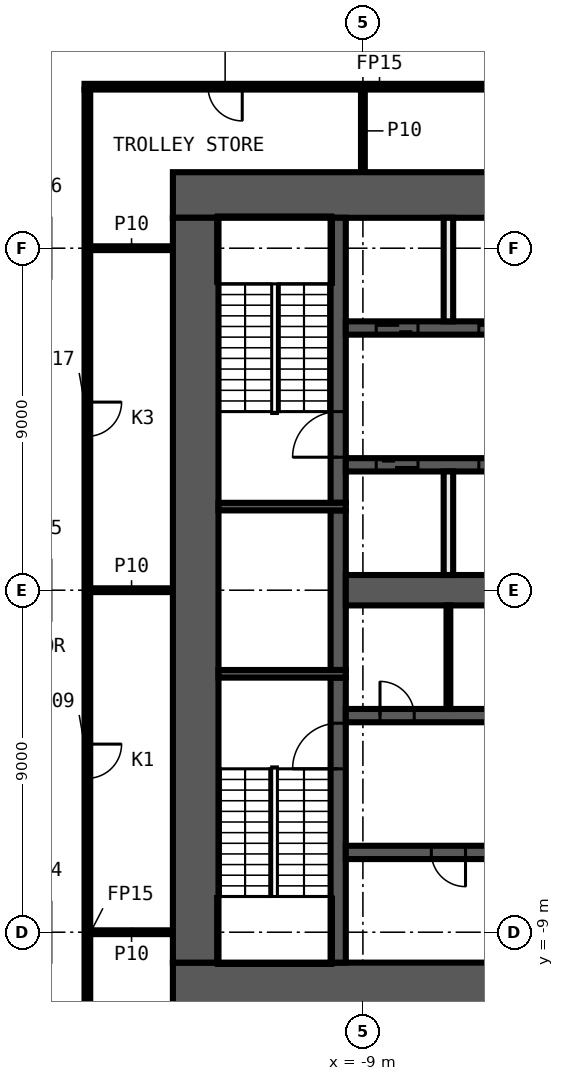
"""IFC4 building model, lengths in metres.
Left out: names, types, materials, properties, quantities, classifications, styles, units other than length and angle.
Written with IfcOpenShell. Run it as: python <this file> out.ifc"""

import sys

from ifc_helpers import new_model, si_unit, direction, frame, frame_2d, origin, place, context, subcontext, project, spatial, rectangle, extrude, element, fill, save


model = new_model("IFC4")
c1 = context("Model", 3, precision=1e-05, world=origin(), true_north=direction((0.0, 1.0)))
c2 = subcontext(c1, "Body", "Model", "MODEL_VIEW")
j1 = project(units=[si_unit("LENGTHUNIT", "METRE"), si_unit("PLANEANGLEUNIT", "RADIAN")], contexts=[c1])
p1 = place(None, origin())
s1 = spatial("IfcSite", under=j1, at=p1, CompositionType="ELEMENT")
p2 = place(p1, origin())
s2 = spatial("IfcBuilding", under=s1, at=p2, CompositionType="ELEMENT")
p3 = place(p2, frame((0.0, 0.0, 84.7)))
s3 = spatial("IfcBuildingStorey", under=s2, at=p3, CompositionType="ELEMENT", Elevation=84.7)
for number, where, z_axis, x_axis in (
    (1, (-16.175, -9.0, 0.0), (0.0, 0.0, 1.0), (1.0, 0.0, 0.0)),
    (2, (-16.175, 0.0, 0.0), (0.0, 0.0, 1.0), (1.0, 0.0, 0.0)),
    (3, (-16.175, 9.0, 0.0), (0.0, 0.0, 1.0), (1.0, 0.0, 0.0)),
):
    element("IfcWall", number, at=place(p3, frame(where, z_axis=z_axis, x_axis=x_axis)), inside=s3, PredefinedType="PARTITIONING", context=c2, shape_type="SweptSolid", body=[
        extrude(rectangle(XDim=2.175, YDim=0.1, at=frame_2d((1.087, 0.0))), origin(), (0.0, 0.0, 1.0), 3.9),
    ])
p4 = place(p3, frame((1.425, 13.25, 0.0), z_axis=(0.0, 0.0, 1.0), x_axis=(-1.0, 0.0, 0.0)))
e4 = element("IfcWall", 4, at=p4, inside=s3, PredefinedType="PARTITIONING", context=c2, shape_type="SweptSolid", body=[
    extrude(rectangle(XDim=17.75, YDim=0.15, at=frame_2d((8.875, 0.0))), origin(), (0.0, 0.0, 1.0), 3.9),
])
p5 = place(p4, frame((5.475, 0.0, 0.0)))
e5 = element("IfcOpeningElement", 5, at=p5, cuts=e4, PredefinedType="OPENING", context=c2, shape_type="SweptSolid", body=[
    extrude(rectangle(XDim=0.9, YDim=2.1, at=frame_2d((0.45, 1.05))), frame((0.0, 0.085, 0.0), z_axis=(0.0, -1.0, 0.0), x_axis=(1.0, 0.0, 0.0)), (0.0, 0.0, 1.0), 0.17),
])
p6 = place(p4, frame((13.6, 0.0, 0.0)))
e6 = element("IfcOpeningElement", 6, at=p6, cuts=e4, PredefinedType="OPENING", context=c2, shape_type="SweptSolid", body=[
    extrude(rectangle(XDim=0.9, YDim=2.1, at=frame_2d((0.45, 1.05))), frame((0.0, 0.085, 0.0), z_axis=(0.0, -1.0, 0.0), x_axis=(1.0, 0.0, 0.0)), (0.0, 0.0, 1.0), 0.17),
])
p7 = place(p3, frame((-9.0, 11.0, 0.0), z_axis=(0.0, 0.0, 1.0), x_axis=(0.0, 1.0, 0.0)))
e7 = element("IfcWall", 7, at=p7, inside=s3, PredefinedType="PARTITIONING", context=c2, shape_type="SweptSolid", body=[
    extrude(rectangle(XDim=2.175, YDim=0.1, at=frame_2d((1.087, 0.0))), origin(), (0.0, 0.0, 1.0), 3.9),
])
p8 = place(p3, frame((-16.25, 13.175, 0.0), z_axis=(0.0, 0.0, 1.0), x_axis=(0.0, -1.0, 0.0)))
e8 = element("IfcWall", 8, at=p8, inside=s3, PredefinedType="PARTITIONING", context=c2, shape_type="SweptSolid", body=[
    extrude(rectangle(XDim=26.35, YDim=0.15, at=frame_2d((13.175, 0.0))), origin(), (0.0, 0.0, 1.0), 3.9),
])
p9 = place(p8, frame((17.225, 0.0, 0.0)))
e9 = element("IfcOpeningElement", 9, at=p9, cuts=e8, PredefinedType="OPENING", context=c2, shape_type="SweptSolid", body=[
    extrude(rectangle(XDim=0.9, YDim=2.1, at=frame_2d((0.45, 1.05))), frame((0.0, 0.085, 0.0), z_axis=(0.0, -1.0, 0.0), x_axis=(1.0, 0.0, 0.0)), (0.0, 0.0, 1.0), 0.17),
])
p10 = place(p8, frame((8.225, 0.0, 0.0)))
e10 = element("IfcOpeningElement", 10, at=p10, cuts=e8, PredefinedType="OPENING", context=c2, shape_type="SweptSolid", body=[
    extrude(rectangle(XDim=0.9, YDim=2.1, at=frame_2d((0.45, 1.05))), frame((0.0, 0.085, 0.0), z_axis=(0.0, -1.0, 0.0), x_axis=(1.0, 0.0, 0.0)), (0.0, 0.0, 1.0), 0.17),
])
p11 = place(p3, frame((-14.0, 10.4, 0.0), z_axis=(0.0, 0.0, 1.0), x_axis=(1.0, 0.0, 0.0)))
e11 = element("IfcWall", 11, at=p11, inside=s3, PredefinedType="SHEAR", context=c2, shape_type="SweptSolid", body=[
    extrude(rectangle(XDim=28.0, YDim=1.2, at=frame_2d((14.0, 0.0))), origin(), (0.0, 0.0, 1.0), 3.9),
])
p12 = place(p11, frame((15.9, 0.0, 0.0)))
e12 = element("IfcOpeningElement", 12, at=p12, cuts=e11, PredefinedType="OPENING", context=c2, shape_type="SweptSolid", body=[
    extrude(rectangle(XDim=1.6, YDim=2.1, at=frame_2d((0.8, 1.05))), frame((0.0, 0.61, 0.0), z_axis=(0.0, -1.0, 0.0), x_axis=(1.0, 0.0, 0.0)), (0.0, 0.0, 1.0), 1.22),
])
p13 = place(p3, frame((14.0, -10.4, 0.0), z_axis=(0.0, 0.0, 1.0), x_axis=(-1.0, 0.0, 0.0)))
e13 = element("IfcWall", 13, at=p13, inside=s3, PredefinedType="SHEAR", context=c2, shape_type="SweptSolid", body=[
    extrude(rectangle(XDim=28.0, YDim=1.2, at=frame_2d((14.0, 0.0))), origin(), (0.0, 0.0, 1.0), 3.9),
])
p14 = place(p13, frame((5.1, 0.0, 0.0)))
e14 = element("IfcOpeningElement", 14, at=p14, cuts=e13, PredefinedType="OPENING", context=c2, shape_type="SweptSolid", body=[
    extrude(rectangle(XDim=1.6, YDim=2.1, at=frame_2d((0.8, 1.05))), frame((0.0, 0.61, 0.0), z_axis=(0.0, -1.0, 0.0), x_axis=(1.0, 0.0, 0.0)), (0.0, 0.0, 1.0), 1.22),
])
p15 = place(p3, frame((-13.4, -9.8, 0.0), z_axis=(0.0, 0.0, 1.0), x_axis=(0.0, 1.0, 0.0)))
e15 = element("IfcWall", 15, at=p15, inside=s3, PredefinedType="SHEAR", context=c2, shape_type="SweptSolid", body=[
    extrude(rectangle(XDim=19.6, YDim=1.2, at=frame_2d((9.8, 0.0))), origin(), (0.0, 0.0, 1.0), 3.9),
])
p16 = place(p3, frame((-9.65, -9.8, 0.0), z_axis=(0.0, 0.0, 1.0), x_axis=(0.0, 1.0, 0.0)))
e16 = element("IfcWall", 16, at=p16, inside=s3, PredefinedType="SHEAR", context=c2, shape_type="SweptSolid", body=[
    extrude(rectangle(XDim=7.5, YDim=0.4, at=frame_2d((3.75, 0.0))), origin(), (0.0, 0.0, 1.0), 3.9),
])
p17 = place(p16, frame((5.1, 0.0, 0.0)))
e17 = element("IfcOpeningElement", 17, at=p17, cuts=e16, PredefinedType="OPENING", context=c2, shape_type="SweptSolid", body=[
    extrude(rectangle(XDim=1.2, YDim=2.1, at=frame_2d((0.6, 1.05))), frame((0.0, 0.21, 0.0), z_axis=(0.0, -1.0, 0.0), x_axis=(1.0, 0.0, 0.0)), (0.0, 0.0, 1.0), 0.42),
])
p18 = place(p3, frame((-9.65, -2.1, 0.0), z_axis=(0.0, 0.0, 1.0), x_axis=(0.0, 1.0, 0.0)))
e18 = element("IfcWall", 18, at=p18, inside=s3, PredefinedType="SHEAR", context=c2, shape_type="SweptSolid", body=[
    extrude(rectangle(XDim=4.2, YDim=0.4, at=frame_2d((2.1, 0.0))), origin(), (0.0, 0.0, 1.0), 3.9),
])
p19 = place(p3, frame((-9.65, 2.3, 0.0), z_axis=(0.0, 0.0, 1.0), x_axis=(0.0, 1.0, 0.0)))
e19 = element("IfcWall", 19, at=p19, inside=s3, PredefinedType="SHEAR", context=c2, shape_type="SweptSolid", body=[
    extrude(rectangle(XDim=7.5, YDim=0.4, at=frame_2d((3.75, 0.0))), origin(), (0.0, 0.0, 1.0), 3.9),
])
p20 = place(p19, frame((1.2, 0.0, 0.0)))
e20 = element("IfcOpeningElement", 20, at=p20, cuts=e19, PredefinedType="OPENING", context=c2, shape_type="SweptSolid", body=[
    extrude(rectangle(XDim=1.2, YDim=2.1, at=frame_2d((0.6, 1.05))), frame((0.0, 0.21, 0.0), z_axis=(0.0, -1.0, 0.0), x_axis=(1.0, 0.0, 0.0)), (0.0, 0.0, 1.0), 0.42),
])
for number, where, z_axis, x_axis in (
    (21, (-9.45, 2.2, 0.0), (0.0, 0.0, 1.0), (-1.0, 0.0, 0.0)),
    (22, (-9.45, -2.2, 0.0), (0.0, 0.0, 1.0), (-1.0, 0.0, 0.0)),
):
    element("IfcWall", number, at=place(p3, frame(where, z_axis=z_axis, x_axis=x_axis)), inside=s3, PredefinedType="SHEAR", context=c2, shape_type="SweptSolid", body=[
        extrude(rectangle(XDim=3.35, YDim=0.2, at=frame_2d((1.675, 0.0))), origin(), (0.0, 0.0, 1.0), 3.9),
    ])
p21 = place(p3, frame((-9.45, 6.9, 0.0), z_axis=(0.0, 0.0, 1.0), x_axis=(1.0, 0.0, 0.0)))
e23 = element("IfcWall", 23, at=p21, inside=s3, PredefinedType="SHEAR", context=c2, shape_type="SweptSolid", body=[
    extrude(rectangle(XDim=18.9, YDim=0.35, at=frame_2d((9.45, 0.0))), origin(), (0.0, 0.0, 1.0), 3.9),
])
p22 = place(p21, frame((0.8, 0.0, 0.0)))
e24 = element("IfcOpeningElement", 24, at=p22, cuts=e23, PredefinedType="OPENING", context=c2, shape_type="SweptSolid", body=[
    extrude(rectangle(XDim=1.1, YDim=2.1, at=frame_2d((0.55, 1.05))), frame((0.0, 0.185, 0.0), z_axis=(0.0, -1.0, 0.0), x_axis=(1.0, 0.0, 0.0)), (0.0, 0.0, 1.0), 0.37),
])
p23 = place(p21, frame((3.5, 0.0, 0.0)))
e25 = element("IfcOpeningElement", 25, at=p23, cuts=e23, PredefinedType="OPENING", context=c2, shape_type="SweptSolid", body=[
    extrude(rectangle(XDim=1.1, YDim=2.1, at=frame_2d((0.55, 1.05))), frame((0.0, 0.185, 0.0), z_axis=(0.0, -1.0, 0.0), x_axis=(1.0, 0.0, 0.0)), (0.0, 0.0, 1.0), 0.37),
])
p24 = place(p21, frame((6.2, 0.0, 0.0)))
e26 = element("IfcOpeningElement", 26, at=p24, cuts=e23, PredefinedType="OPENING", context=c2, shape_type="SweptSolid", body=[
    extrude(rectangle(XDim=1.1, YDim=2.1, at=frame_2d((0.55, 1.05))), frame((0.0, 0.185, 0.0), z_axis=(0.0, -1.0, 0.0), x_axis=(1.0, 0.0, 0.0)), (0.0, 0.0, 1.0), 0.37),
])
p25 = place(p21, frame((8.9, 0.0, 0.0)))
e27 = element("IfcOpeningElement", 27, at=p25, cuts=e23, PredefinedType="OPENING", context=c2, shape_type="SweptSolid", body=[
    extrude(rectangle(XDim=1.1, YDim=2.1, at=frame_2d((0.55, 1.05))), frame((0.0, 0.185, 0.0), z_axis=(0.0, -1.0, 0.0), x_axis=(1.0, 0.0, 0.0)), (0.0, 0.0, 1.0), 0.37),
])
p26 = place(p21, frame((11.55, 0.0, 0.0)))
e28 = element("IfcOpeningElement", 28, at=p26, cuts=e23, PredefinedType="OPENING", context=c2, shape_type="SweptSolid", body=[
    extrude(rectangle(XDim=1.2, YDim=2.1, at=frame_2d((0.6, 1.05))), frame((0.0, 0.185, 0.0), z_axis=(0.0, -1.0, 0.0), x_axis=(1.0, 0.0, 0.0)), (0.0, 0.0, 1.0), 0.37),
])
p27 = place(p21, frame((14.3, 0.0, 0.0)))
e29 = element("IfcOpeningElement", 29, at=p27, cuts=e23, PredefinedType="OPENING", context=c2, shape_type="SweptSolid", body=[
    extrude(rectangle(XDim=1.1, YDim=2.1, at=frame_2d((0.55, 1.05))), frame((0.0, 0.185, 0.0), z_axis=(0.0, -1.0, 0.0), x_axis=(1.0, 0.0, 0.0)), (0.0, 0.0, 1.0), 0.37),
])
p28 = place(p21, frame((17.0, 0.0, 0.0)))
e30 = element("IfcOpeningElement", 30, at=p28, cuts=e23, PredefinedType="OPENING", context=c2, shape_type="SweptSolid", body=[
    extrude(rectangle(XDim=1.1, YDim=2.1, at=frame_2d((0.55, 1.05))), frame((0.0, 0.185, 0.0), z_axis=(0.0, -1.0, 0.0), x_axis=(1.0, 0.0, 0.0)), (0.0, 0.0, 1.0), 0.37),
])
p29 = place(p3, frame((9.45, 3.3, 0.0), z_axis=(0.0, 0.0, 1.0), x_axis=(-1.0, 0.0, 0.0)))
e31 = element("IfcWall", 31, at=p29, inside=s3, PredefinedType="SHEAR", context=c2, shape_type="SweptSolid", body=[
    extrude(rectangle(XDim=18.9, YDim=0.35, at=frame_2d((9.45, 0.0))), origin(), (0.0, 0.0, 1.0), 3.9),
])
p30 = place(p29, frame((17.0, 0.0, 0.0)))
e32 = element("IfcOpeningElement", 32, at=p30, cuts=e31, PredefinedType="OPENING", context=c2, shape_type="SweptSolid", body=[
    extrude(rectangle(XDim=1.1, YDim=2.1, at=frame_2d((0.55, 1.05))), frame((0.0, 0.185, 0.0), z_axis=(0.0, -1.0, 0.0), x_axis=(1.0, 0.0, 0.0)), (0.0, 0.0, 1.0), 0.37),
])
p31 = place(p29, frame((14.3, 0.0, 0.0)))
e33 = element("IfcOpeningElement", 33, at=p31, cuts=e31, PredefinedType="OPENING", context=c2, shape_type="SweptSolid", body=[
    extrude(rectangle(XDim=1.1, YDim=2.1, at=frame_2d((0.55, 1.05))), frame((0.0, 0.185, 0.0), z_axis=(0.0, -1.0, 0.0), x_axis=(1.0, 0.0, 0.0)), (0.0, 0.0, 1.0), 0.37),
])
p32 = place(p29, frame((11.6, 0.0, 0.0)))
e34 = element("IfcOpeningElement", 34, at=p32, cuts=e31, PredefinedType="OPENING", context=c2, shape_type="SweptSolid", body=[
    extrude(rectangle(XDim=1.1, YDim=2.1, at=frame_2d((0.55, 1.05))), frame((0.0, 0.185, 0.0), z_axis=(0.0, -1.0, 0.0), x_axis=(1.0, 0.0, 0.0)), (0.0, 0.0, 1.0), 0.37),
])
p33 = place(p29, frame((8.9, 0.0, 0.0)))
e35 = element("IfcOpeningElement", 35, at=p33, cuts=e31, PredefinedType="OPENING", context=c2, shape_type="SweptSolid", body=[
    extrude(rectangle(XDim=1.1, YDim=2.1, at=frame_2d((0.55, 1.05))), frame((0.0, 0.185, 0.0), z_axis=(0.0, -1.0, 0.0), x_axis=(1.0, 0.0, 0.0)), (0.0, 0.0, 1.0), 0.37),
])
p34 = place(p29, frame((6.2, 0.0, 0.0)))
e36 = element("IfcOpeningElement", 36, at=p34, cuts=e31, PredefinedType="OPENING", context=c2, shape_type="SweptSolid", body=[
    extrude(rectangle(XDim=1.1, YDim=2.1, at=frame_2d((0.55, 1.05))), frame((0.0, 0.185, 0.0), z_axis=(0.0, -1.0, 0.0), x_axis=(1.0, 0.0, 0.0)), (0.0, 0.0, 1.0), 0.37),
])
p35 = place(p29, frame((3.5, 0.0, 0.0)))
e37 = element("IfcOpeningElement", 37, at=p35, cuts=e31, PredefinedType="OPENING", context=c2, shape_type="SweptSolid", body=[
    extrude(rectangle(XDim=1.1, YDim=2.1, at=frame_2d((0.55, 1.05))), frame((0.0, 0.185, 0.0), z_axis=(0.0, -1.0, 0.0), x_axis=(1.0, 0.0, 0.0)), (0.0, 0.0, 1.0), 0.37),
])
p36 = place(p29, frame((0.9, 0.0, 0.0)))
e38 = element("IfcOpeningElement", 38, at=p36, cuts=e31, PredefinedType="OPENING", context=c2, shape_type="SweptSolid", body=[
    extrude(rectangle(XDim=0.9, YDim=2.1, at=frame_2d((0.45, 1.05))), frame((0.0, 0.185, 0.0), z_axis=(0.0, -1.0, 0.0), x_axis=(1.0, 0.0, 0.0)), (0.0, 0.0, 1.0), 0.37),
])
p37 = place(p3, frame((-9.45, -3.3, 0.0), z_axis=(0.0, 0.0, 1.0), x_axis=(1.0, 0.0, 0.0)))
e39 = element("IfcWall", 39, at=p37, inside=s3, PredefinedType="SHEAR", context=c2, shape_type="SweptSolid", body=[
    extrude(rectangle(XDim=18.9, YDim=0.35, at=frame_2d((9.45, 0.0))), origin(), (0.0, 0.0, 1.0), 3.9),
])
p38 = place(p37, frame((17.0, 0.0, 0.0)))
e40 = element("IfcOpeningElement", 40, at=p38, cuts=e39, PredefinedType="OPENING", context=c2, shape_type="SweptSolid", body=[
    extrude(rectangle(XDim=1.1, YDim=2.1, at=frame_2d((0.55, 1.05))), frame((0.0, 0.185, 0.0), z_axis=(0.0, -1.0, 0.0), x_axis=(1.0, 0.0, 0.0)), (0.0, 0.0, 1.0), 0.37),
])
p39 = place(p37, frame((0.9, 0.0, 0.0)))
e41 = element("IfcOpeningElement", 41, at=p39, cuts=e39, PredefinedType="OPENING", context=c2, shape_type="SweptSolid", body=[
    extrude(rectangle(XDim=0.9, YDim=2.1, at=frame_2d((0.45, 1.05))), frame((0.0, 0.185, 0.0), z_axis=(0.0, -1.0, 0.0), x_axis=(1.0, 0.0, 0.0)), (0.0, 0.0, 1.0), 0.37),
])
p40 = place(p37, frame((6.3, 0.0, 0.0)))
e42 = element("IfcOpeningElement", 42, at=p40, cuts=e39, PredefinedType="OPENING", context=c2, shape_type="SweptSolid", body=[
    extrude(rectangle(XDim=0.9, YDim=2.1, at=frame_2d((0.45, 1.05))), frame((0.0, 0.185, 0.0), z_axis=(0.0, -1.0, 0.0), x_axis=(1.0, 0.0, 0.0)), (0.0, 0.0, 1.0), 0.37),
])
p41 = place(p3, frame((9.45, -6.9, 0.0), z_axis=(0.0, 0.0, 1.0), x_axis=(-1.0, 0.0, 0.0)))
e43 = element("IfcWall", 43, at=p41, inside=s3, PredefinedType="SHEAR", context=c2, shape_type="SweptSolid", body=[
    extrude(rectangle(XDim=18.9, YDim=0.35, at=frame_2d((9.45, 0.0))), origin(), (0.0, 0.0, 1.0), 3.9),
])
p42 = place(p41, frame((0.75, 0.0, 0.0)))
e44 = element("IfcOpeningElement", 44, at=p42, cuts=e43, PredefinedType="OPENING", context=c2, shape_type="SweptSolid", body=[
    extrude(rectangle(XDim=1.2, YDim=2.1, at=frame_2d((0.6, 1.05))), frame((0.0, 0.185, 0.0), z_axis=(0.0, -1.0, 0.0), x_axis=(1.0, 0.0, 0.0)), (0.0, 0.0, 1.0), 0.37),
])
p43 = place(p41, frame((15.75, 0.0, 0.0)))
e45 = element("IfcOpeningElement", 45, at=p43, cuts=e43, PredefinedType="OPENING", context=c2, shape_type="SweptSolid", body=[
    extrude(rectangle(XDim=0.9, YDim=2.1, at=frame_2d((0.45, 1.05))), frame((0.0, 0.185, 0.0), z_axis=(0.0, -1.0, 0.0), x_axis=(1.0, 0.0, 0.0)), (0.0, 0.0, 1.0), 0.37),
])
p44 = place(p41, frame((11.7, 0.0, 0.0)))
e46 = element("IfcOpeningElement", 46, at=p44, cuts=e43, PredefinedType="OPENING", context=c2, shape_type="SweptSolid", body=[
    extrude(rectangle(XDim=0.9, YDim=2.1, at=frame_2d((0.45, 1.05))), frame((0.0, 0.185, 0.0), z_axis=(0.0, -1.0, 0.0), x_axis=(1.0, 0.0, 0.0)), (0.0, 0.0, 1.0), 0.37),
])
p45 = place(p41, frame((9.0, 0.0, 0.0)))
e47 = element("IfcOpeningElement", 47, at=p45, cuts=e43, PredefinedType="OPENING", context=c2, shape_type="SweptSolid", body=[
    extrude(rectangle(XDim=0.9, YDim=2.1, at=frame_2d((0.45, 1.05))), frame((0.0, 0.185, 0.0), z_axis=(0.0, -1.0, 0.0), x_axis=(1.0, 0.0, 0.0)), (0.0, 0.0, 1.0), 0.37),
])
p46 = place(p3, frame((-9.45, 0.0, 0.0), z_axis=(0.0, 0.0, 1.0), x_axis=(1.0, 0.0, 0.0)))
e48 = element("IfcWall", 48, at=p46, inside=s3, PredefinedType="SHEAR", context=c2, shape_type="SweptSolid", body=[
    extrude(rectangle(XDim=18.9, YDim=0.8, at=frame_2d((9.45, 0.0))), origin(), (0.0, 0.0, 1.0), 3.9),
])
p47 = place(p3, frame((-6.75, -3.125, 0.0), z_axis=(0.0, 0.0, 1.0), x_axis=(0.0, 1.0, 0.0)))
e49 = element("IfcWall", 49, at=p47, inside=s3, PredefinedType="PARTITIONING", context=c2, shape_type="SweptSolid", body=[
    extrude(rectangle(XDim=2.725, YDim=0.1, at=frame_2d((1.363, 0.0))), origin(), (0.0, 0.0, 1.0), 3.9),
])
for number, where, z_axis, x_axis in (
    (50, (-6.75, 0.4, 0.0), (0.0, 0.0, 1.0), (0.0, 1.0, 0.0)),
    (51, (-6.75, 7.075, 0.0), (0.0, 0.0, 1.0), (0.0, 1.0, 0.0)),
):
    element("IfcWall", number, at=place(p3, frame(where, z_axis=z_axis, x_axis=x_axis)), inside=s3, PredefinedType="SOLIDWALL", context=c2, shape_type="SweptSolid", body=[
        extrude(rectangle(XDim=2.725, YDim=0.25, at=frame_2d((1.363, 0.0))), origin(), (0.0, 0.0, 1.0), 3.9),
    ])
p48 = place(p9, origin())
e52 = element("IfcDoor", 52, at=p48, inside=s3, OperationType="SINGLE_SWING_LEFT", PredefinedType="DOOR", context=c2, shape_type="SweptSolid", body=[
    extrude(rectangle(XDim=0.9, YDim=2.1, at=frame_2d((0.45, 1.05))), frame((0.0, 0.025, 0.0), z_axis=(0.0, -1.0, 0.0), x_axis=(1.0, 0.0, 0.0)), (0.0, 0.0, 1.0), 0.05),
])
fill(e9, e52)
p49 = place(p6, origin())
e53 = element("IfcDoor", 53, at=p49, inside=s3, OperationType="SINGLE_SWING_RIGHT", PredefinedType="DOOR", context=c2, shape_type="SweptSolid", body=[
    extrude(rectangle(XDim=0.9, YDim=2.1, at=frame_2d((0.45, 1.05))), frame((0.0, 0.025, 0.0), z_axis=(0.0, -1.0, 0.0), x_axis=(1.0, 0.0, 0.0)), (0.0, 0.0, 1.0), 0.05),
])
fill(e6, e53)
p50 = place(p10, origin())
e54 = element("IfcDoor", 54, at=p50, inside=s3, OperationType="SINGLE_SWING_LEFT", PredefinedType="DOOR", context=c2, shape_type="SweptSolid", body=[
    extrude(rectangle(XDim=0.9, YDim=2.1, at=frame_2d((0.45, 1.05))), frame((0.0, 0.025, 0.0), z_axis=(0.0, -1.0, 0.0), x_axis=(1.0, 0.0, 0.0)), (0.0, 0.0, 1.0), 0.05),
])
fill(e10, e54)
p51 = place(p22, origin())
e55 = element("IfcDoor", 55, at=p51, inside=s3, OperationType="DOUBLE_DOOR_SLIDING", PredefinedType="DOOR", context=c2, shape_type="SweptSolid", body=[
    extrude(rectangle(XDim=1.1, YDim=2.1, at=frame_2d((0.55, 1.05))), frame((0.0, 0.025, 0.0), z_axis=(0.0, -1.0, 0.0), x_axis=(1.0, 0.0, 0.0)), (0.0, 0.0, 1.0), 0.05),
])
fill(e24, e55)
p52 = place(p23, origin())
e56 = element("IfcDoor", 56, at=p52, inside=s3, OperationType="DOUBLE_DOOR_SLIDING", PredefinedType="DOOR", context=c2, shape_type="SweptSolid", body=[
    extrude(rectangle(XDim=1.1, YDim=2.1, at=frame_2d((0.55, 1.05))), frame((0.0, 0.025, 0.0), z_axis=(0.0, -1.0, 0.0), x_axis=(1.0, 0.0, 0.0)), (0.0, 0.0, 1.0), 0.05),
])
fill(e25, e56)
p53 = place(p30, origin())
e57 = element("IfcDoor", 57, at=p53, inside=s3, OperationType="DOUBLE_DOOR_SLIDING", PredefinedType="DOOR", context=c2, shape_type="SweptSolid", body=[
    extrude(rectangle(XDim=1.1, YDim=2.1, at=frame_2d((0.55, 1.05))), frame((0.0, 0.025, 0.0), z_axis=(0.0, -1.0, 0.0), x_axis=(1.0, 0.0, 0.0)), (0.0, 0.0, 1.0), 0.05),
])
fill(e32, e57)
p54 = place(p31, origin())
e58 = element("IfcDoor", 58, at=p54, inside=s3, OperationType="DOUBLE_DOOR_SLIDING", PredefinedType="DOOR", context=c2, shape_type="SweptSolid", body=[
    extrude(rectangle(XDim=1.1, YDim=2.1, at=frame_2d((0.55, 1.05))), frame((0.0, 0.025, 0.0), z_axis=(0.0, -1.0, 0.0), x_axis=(1.0, 0.0, 0.0)), (0.0, 0.0, 1.0), 0.05),
])
fill(e33, e58)
p55 = place(p39, origin())
e59 = element("IfcDoor", 59, at=p55, inside=s3, OperationType="SINGLE_SWING_RIGHT", PredefinedType="DOOR", context=c2, shape_type="SweptSolid", body=[
    extrude(rectangle(XDim=0.9, YDim=2.1, at=frame_2d((0.45, 1.05))), frame((0.0, 0.025, 0.0), z_axis=(0.0, -1.0, 0.0), x_axis=(1.0, 0.0, 0.0)), (0.0, 0.0, 1.0), 0.05),
])
fill(e41, e59)
p56 = place(p43, origin())
e60 = element("IfcDoor", 60, at=p56, inside=s3, OperationType="SINGLE_SWING_RIGHT", PredefinedType="DOOR", context=c2, shape_type="SweptSolid", body=[
    extrude(rectangle(XDim=0.9, YDim=2.1, at=frame_2d((0.45, 1.05))), frame((0.0, 0.025, 0.0), z_axis=(0.0, -1.0, 0.0), x_axis=(1.0, 0.0, 0.0)), (0.0, 0.0, 1.0), 0.05),
])
fill(e45, e60)
p57 = place(p20, origin())
e61 = element("IfcDoor", 61, at=p57, inside=s3, OperationType="SINGLE_SWING_RIGHT", PredefinedType="DOOR", context=c2, shape_type="SweptSolid", body=[
    extrude(rectangle(XDim=1.2, YDim=2.1, at=frame_2d((0.6, 1.05))), frame((0.0, 0.025, 0.0), z_axis=(0.0, -1.0, 0.0), x_axis=(1.0, 0.0, 0.0)), (0.0, 0.0, 1.0), 0.05),
])
fill(e20, e61)
p58 = place(p17, origin())
e62 = element("IfcDoor", 62, at=p58, inside=s3, OperationType="SINGLE_SWING_LEFT", PredefinedType="DOOR", context=c2, shape_type="SweptSolid", body=[
    extrude(rectangle(XDim=1.2, YDim=2.1, at=frame_2d((0.6, 1.05))), frame((0.0, 0.025, 0.0), z_axis=(0.0, -1.0, 0.0), x_axis=(1.0, 0.0, 0.0)), (0.0, 0.0, 1.0), 0.05),
])
fill(e17, e62)
save(model, sys.argv[1])
